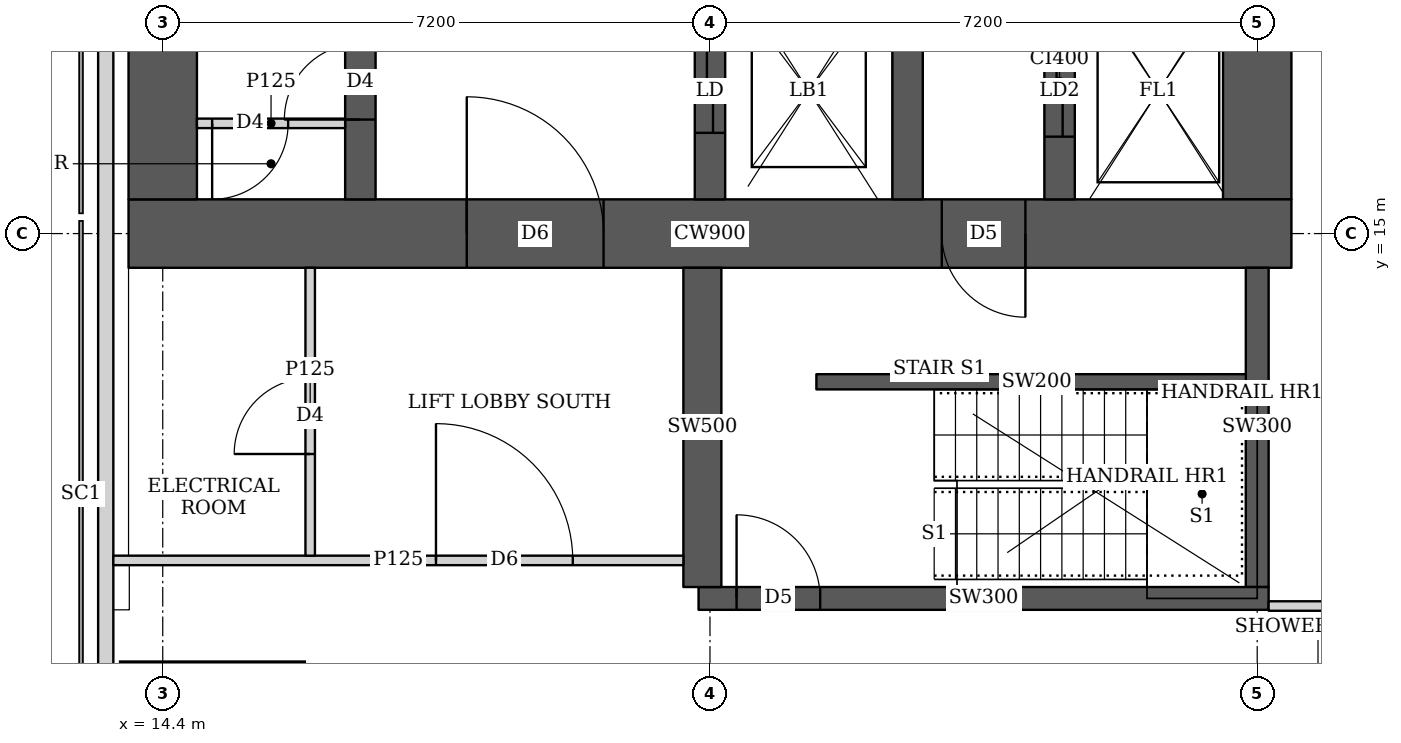
"""IFC4 building model, lengths in metres.
Left out: names, types, materials, properties, quantities, classifications, styles, units other than length and angle.
Written with IfcOpenShell. Run it as: python <this file> out.ifc"""

import sys

from ifc_helpers import new_model, si_unit, direction, frame, frame_2d, origin, origin_2d, place, context, subcontext, project, spatial, rectangle, extrude, element, fill, save


model = new_model("IFC4")
c1 = context("Model", 3, precision=1e-05, world=origin(), true_north=direction((0.0, 1.0)))
c2 = subcontext(c1, "Body", "Model", "MODEL_VIEW")
j1 = project(units=[si_unit("LENGTHUNIT", "METRE"), si_unit("PLANEANGLEUNIT", "RADIAN")], contexts=[c1])
p1 = place(None, origin())
s1 = spatial("IfcSite", under=j1, at=p1, CompositionType="ELEMENT")
p2 = place(p1, origin())
s2 = spatial("IfcBuilding", under=s1, at=p2, CompositionType="ELEMENT")
p3 = place(p2, frame((0.0, 0.0, 234.95)))
s3 = spatial("IfcBuildingStorey", under=s2, at=p3, CompositionType="ELEMENT", Elevation=234.95)
p4 = place(p3, frame((15.054, 8.154, 0.0), z_axis=(0.0, 0.0, 1.0), x_axis=(1.0, 0.0, 0.0)))
e1 = element("IfcColumn", 1, at=p4, inside=s3, PredefinedType="COLUMN", context=c2, shape_type="SweptSolid", body=[
    extrude(rectangle(XDim=2.4, YDim=2.4, at=origin_2d()), origin(), (0.0, 0.0, 1.0), 3.75),
])
p5 = place(p3, frame((13.95, 15.0, 0.0), z_axis=(0.0, 0.0, 1.0), x_axis=(1.0, 0.0, 0.0)))
e2 = element("IfcWall", 2, at=p5, inside=s3, PredefinedType="SHEAR", context=c2, shape_type="SweptSolid", body=[
    extrude(rectangle(XDim=15.3, YDim=0.9, at=frame_2d((7.65, 0.0))), origin(), (0.0, 0.0, 1.0), 3.75),
])
p6 = place(p5, frame((4.45, 0.0, 0.0)))
e3 = element("IfcOpeningElement", 3, at=p6, cuts=e2, PredefinedType="OPENING", context=c2, shape_type="SweptSolid", body=[
    extrude(rectangle(XDim=1.8, YDim=2.1, at=frame_2d((0.9, 1.05))), frame((0.0, 0.46, 0.0), z_axis=(0.0, -1.0, 0.0), x_axis=(1.0, 0.0, 0.0)), (0.0, 0.0, 1.0), 0.92),
])
p7 = place(p5, frame((10.7, 0.0, 0.0)))
e4 = element("IfcOpeningElement", 4, at=p7, cuts=e2, PredefinedType="OPENING", context=c2, shape_type="SweptSolid", body=[
    extrude(rectangle(XDim=1.1, YDim=2.1, at=frame_2d((0.55, 1.05))), frame((0.0, 0.46, 0.0), z_axis=(0.0, -1.0, 0.0), x_axis=(1.0, 0.0, 0.0)), (0.0, 0.0, 1.0), 0.92),
])
for number, where, z_axis, x_axis in (
    (5, (14.4, 15.45, 0.0), (0.0, 0.0, 1.0), (0.0, 1.0, 0.0)),
    (6, (28.8, 15.45, 0.0), (0.0, 0.0, 1.0), (0.0, 1.0, 0.0)),
):
    element("IfcWall", number, at=place(p3, frame(where, z_axis=z_axis, x_axis=x_axis)), inside=s3, PredefinedType="SHEAR", context=c2, shape_type="SweptSolid", body=[
        extrude(rectangle(XDim=14.1, YDim=0.9, at=frame_2d((7.05, 0.0))), origin(), (0.0, 0.0, 1.0), 3.75),
    ])
p8 = place(p3, frame((17.0, 15.45, 0.0), z_axis=(0.0, 0.0, 1.0), x_axis=(0.0, 1.0, 0.0)))
e7 = element("IfcWall", 7, at=p8, inside=s3, PredefinedType="SHEAR", context=c2, shape_type="SweptSolid", body=[
    extrude(rectangle(XDim=14.1, YDim=0.4, at=frame_2d((7.05, 0.0))), origin(), (0.0, 0.0, 1.0), 3.75),
])
p9 = place(p8, frame((1.05, 0.0, 0.0)))
e8 = element("IfcOpeningElement", 8, at=p9, cuts=e7, PredefinedType="OPENING", context=c2, shape_type="SweptSolid", body=[
    extrude(rectangle(XDim=1.0, YDim=2.1, at=frame_2d((0.5, 1.05))), frame((0.0, 0.21, 0.0), z_axis=(0.0, -1.0, 0.0), x_axis=(1.0, 0.0, 0.0)), (0.0, 0.0, 1.0), 0.42),
])
p10 = place(p8, frame((4.675, 0.0, 0.0)))
e9 = element("IfcOpeningElement", 9, at=p10, cuts=e7, PredefinedType="OPENING", context=c2, shape_type="SweptSolid", body=[
    extrude(rectangle(XDim=1.0, YDim=2.1, at=frame_2d((0.5, 1.05))), frame((0.0, 0.21, 0.0), z_axis=(0.0, -1.0, 0.0), x_axis=(1.0, 0.0, 0.0)), (0.0, 0.0, 1.0), 0.42),
])
p11 = place(p8, frame((8.425, 0.0, 0.0)))
e10 = element("IfcOpeningElement", 10, at=p11, cuts=e7, PredefinedType="OPENING", context=c2, shape_type="SweptSolid", body=[
    extrude(rectangle(XDim=1.0, YDim=2.1, at=frame_2d((0.5, 1.05))), frame((0.0, 0.21, 0.0), z_axis=(0.0, -1.0, 0.0), x_axis=(1.0, 0.0, 0.0)), (0.0, 0.0, 1.0), 0.42),
])
p12 = place(p8, frame((12.175, 0.0, 0.0)))
e11 = element("IfcOpeningElement", 11, at=p12, cuts=e7, PredefinedType="OPENING", context=c2, shape_type="SweptSolid", body=[
    extrude(rectangle(XDim=1.0, YDim=2.1, at=frame_2d((0.5, 1.05))), frame((0.0, 0.21, 0.0), z_axis=(0.0, -1.0, 0.0), x_axis=(1.0, 0.0, 0.0)), (0.0, 0.0, 1.0), 0.42),
])
p13 = place(p3, frame((21.6, 15.45, 0.0), z_axis=(0.0, 0.0, 1.0), x_axis=(0.0, 1.0, 0.0)))
e12 = element("IfcWall", 12, at=p13, inside=s3, PredefinedType="SHEAR", context=c2, shape_type="SweptSolid", body=[
    extrude(rectangle(XDim=14.1, YDim=0.4, at=frame_2d((7.05, 0.0))), origin(), (0.0, 0.0, 1.0), 3.75),
])
p14 = place(p13, frame((0.875, 0.0, 0.0)))
e13 = element("IfcOpeningElement", 13, at=p14, cuts=e12, PredefinedType="OPENING", context=c2, shape_type="SweptSolid", body=[
    extrude(rectangle(XDim=1.1, YDim=2.1, at=frame_2d((0.55, 1.05))), frame((0.0, 0.21, 0.0), z_axis=(0.0, -1.0, 0.0), x_axis=(1.0, 0.0, 0.0)), (0.0, 0.0, 1.0), 0.42),
])
p15 = place(p13, frame((4.625, 0.0, 0.0)))
e14 = element("IfcOpeningElement", 14, at=p15, cuts=e12, PredefinedType="OPENING", context=c2, shape_type="SweptSolid", body=[
    extrude(rectangle(XDim=1.1, YDim=2.1, at=frame_2d((0.55, 1.05))), frame((0.0, 0.21, 0.0), z_axis=(0.0, -1.0, 0.0), x_axis=(1.0, 0.0, 0.0)), (0.0, 0.0, 1.0), 0.42),
])
p16 = place(p13, frame((8.375, 0.0, 0.0)))
e15 = element("IfcOpeningElement", 15, at=p16, cuts=e12, PredefinedType="OPENING", context=c2, shape_type="SweptSolid", body=[
    extrude(rectangle(XDim=1.1, YDim=2.1, at=frame_2d((0.55, 1.05))), frame((0.0, 0.21, 0.0), z_axis=(0.0, -1.0, 0.0), x_axis=(1.0, 0.0, 0.0)), (0.0, 0.0, 1.0), 0.42),
])
p17 = place(p13, frame((12.125, 0.0, 0.0)))
e16 = element("IfcOpeningElement", 16, at=p17, cuts=e12, PredefinedType="OPENING", context=c2, shape_type="SweptSolid", body=[
    extrude(rectangle(XDim=1.1, YDim=2.1, at=frame_2d((0.55, 1.05))), frame((0.0, 0.21, 0.0), z_axis=(0.0, -1.0, 0.0), x_axis=(1.0, 0.0, 0.0)), (0.0, 0.0, 1.0), 0.42),
])
p18 = place(p3, frame((24.2, 15.45, 0.0), z_axis=(0.0, 0.0, 1.0), x_axis=(0.0, 1.0, 0.0)))
e17 = element("IfcWall", 17, at=p18, inside=s3, PredefinedType="SHEAR", context=c2, shape_type="SweptSolid", body=[
    extrude(rectangle(XDim=14.1, YDim=0.4, at=frame_2d((7.05, 0.0))), origin(), (0.0, 0.0, 1.0), 3.75),
])
p19 = place(p3, frame((26.2, 15.45, 0.0), z_axis=(0.0, 0.0, 1.0), x_axis=(0.0, 1.0, 0.0)))
e18 = element("IfcWall", 18, at=p19, inside=s3, PredefinedType="SHEAR", context=c2, shape_type="SweptSolid", body=[
    extrude(rectangle(XDim=3.1, YDim=0.4, at=frame_2d((1.55, 0.0))), origin(), (0.0, 0.0, 1.0), 3.75),
])
p20 = place(p19, frame((0.825, 0.0, 0.0)))
e19 = element("IfcOpeningElement", 19, at=p20, cuts=e18, PredefinedType="OPENING", context=c2, shape_type="SweptSolid", body=[
    extrude(rectangle(XDim=1.2, YDim=2.1, at=frame_2d((0.6, 1.05))), frame((0.0, 0.21, 0.0), z_axis=(0.0, -1.0, 0.0), x_axis=(1.0, 0.0, 0.0)), (0.0, 0.0, 1.0), 0.42),
])
p21 = place(p3, frame((21.45, 10.2, 0.0), z_axis=(0.0, 0.0, 1.0), x_axis=(1.0, 0.0, 0.0)))
e20 = element("IfcWall", 20, at=p21, inside=s3, PredefinedType="SHEAR", context=c2, shape_type="SweptSolid", body=[
    extrude(rectangle(XDim=7.5, YDim=0.3, at=frame_2d((3.75, 0.0))), origin(), (0.0, 0.0, 1.0), 3.75),
])
p22 = place(p21, frame((0.5, 0.0, 0.0)))
e21 = element("IfcOpeningElement", 21, at=p22, cuts=e20, PredefinedType="OPENING", context=c2, shape_type="SweptSolid", body=[
    extrude(rectangle(XDim=1.1, YDim=2.1, at=frame_2d((0.55, 1.05))), frame((0.0, 0.16, 0.0), z_axis=(0.0, -1.0, 0.0), x_axis=(1.0, 0.0, 0.0)), (0.0, 0.0, 1.0), 0.32),
])
p23 = place(p3, frame((21.5, 10.35, 0.0), z_axis=(0.0, 0.0, 1.0), x_axis=(0.0, 1.0, 0.0)))
e22 = element("IfcWall", 22, at=p23, inside=s3, PredefinedType="SHEAR", context=c2, shape_type="SweptSolid", body=[
    extrude(rectangle(XDim=4.2, YDim=0.5, at=frame_2d((2.1, 0.0))), origin(), (0.0, 0.0, 1.0), 3.75),
])
p24 = place(p3, frame((28.8, 10.35, 0.0), z_axis=(0.0, 0.0, 1.0), x_axis=(0.0, 1.0, 0.0)))
e23 = element("IfcWall", 23, at=p24, inside=s3, PredefinedType="SHEAR", context=c2, shape_type="SweptSolid", body=[
    extrude(rectangle(XDim=4.2, YDim=0.3, at=frame_2d((2.1, 0.0))), origin(), (0.0, 0.0, 1.0), 3.75),
])
p25 = place(p3, frame((13.65, 44.837, 0.0), z_axis=(0.0, 0.0, 1.0), x_axis=(0.0, -1.0, 0.0)))
e24 = element("IfcWall", 24, at=p25, inside=s3, PredefinedType="SOLIDWALL", context=c2, shape_type="SweptSolid", body=[
    extrude(rectangle(XDim=44.674, YDim=0.2, at=frame_2d((22.337, 0.0))), origin(), (0.0, 0.0, 1.0), 3.5),
])
p26 = place(p25, frame((1.889, 0.0, 0.9)))
e25 = element("IfcOpeningElement", 25, at=p26, cuts=e24, PredefinedType="OPENING", context=c2, shape_type="SweptSolid", body=[
    extrude(rectangle(XDim=2.4, YDim=1.5, at=frame_2d((1.2, 0.75))), frame((0.0, 0.11, 0.0), z_axis=(0.0, -1.0, 0.0), x_axis=(1.0, 0.0, 0.0)), (0.0, 0.0, 1.0), 0.22),
])
p27 = place(p25, frame((40.385, 0.0, 0.9)))
e26 = element("IfcOpeningElement", 26, at=p27, cuts=e24, PredefinedType="OPENING", context=c2, shape_type="SweptSolid", body=[
    extrude(rectangle(XDim=2.4, YDim=1.5, at=frame_2d((1.2, 0.75))), frame((0.0, 0.11, 0.0), z_axis=(0.0, -1.0, 0.0), x_axis=(1.0, 0.0, 0.0)), (0.0, 0.0, 1.0), 0.22),
])
p28 = place(p3, frame((13.75, 10.7, 0.0), z_axis=(0.0, 0.0, 1.0), x_axis=(1.0, 0.0, 0.0)))
e27 = element("IfcWall", 27, at=p28, inside=s3, PredefinedType="PARTITIONING", context=c2, shape_type="SweptSolid", body=[
    extrude(rectangle(XDim=7.5, YDim=0.125, at=frame_2d((3.75, 0.0))), origin(), (0.0, 0.0, 1.0), 3.5),
])
p29 = place(p28, frame((4.245, 0.0, 0.0)))
e28 = element("IfcOpeningElement", 28, at=p29, cuts=e27, PredefinedType="OPENING", context=c2, shape_type="SweptSolid", body=[
    extrude(rectangle(XDim=1.8, YDim=2.1, at=frame_2d((0.9, 1.05))), frame((0.0, 0.073, 0.0), z_axis=(0.0, -1.0, 0.0), x_axis=(1.0, 0.0, 0.0)), (0.0, 0.0, 1.0), 0.145),
])
p30 = place(p3, frame((16.34, 10.762, 0.0), z_axis=(0.0, 0.0, 1.0), x_axis=(0.0, 1.0, 0.0)))
e29 = element("IfcWall", 29, at=p30, inside=s3, PredefinedType="PARTITIONING", context=c2, shape_type="SweptSolid", body=[
    extrude(rectangle(XDim=3.788, YDim=0.125, at=frame_2d((1.894, 0.0))), origin(), (0.0, 0.0, 1.0), 3.5),
])
p31 = place(p30, frame((1.338, 0.0, 0.0)))
e30 = element("IfcOpeningElement", 30, at=p31, cuts=e29, PredefinedType="OPENING", context=c2, shape_type="SweptSolid", body=[
    extrude(rectangle(XDim=1.0, YDim=2.1, at=frame_2d((0.5, 1.05))), frame((0.0, 0.073, 0.0), z_axis=(0.0, -1.0, 0.0), x_axis=(1.0, 0.0, 0.0)), (0.0, 0.0, 1.0), 0.145),
])
p32 = place(p3, frame((28.95, 10.1, 0.0), z_axis=(0.0, 0.0, 1.0), x_axis=(1.0, 0.0, 0.0)))
e31 = element("IfcWall", 31, at=p32, inside=s3, PredefinedType="PARTITIONING", context=c2, shape_type="SweptSolid", body=[
    extrude(rectangle(XDim=9.188, YDim=0.125, at=frame_2d((4.594, 0.0))), origin(), (0.0, 0.0, 1.0), 3.5),
])
p33 = place(p3, frame((14.85, 16.45, 0.0), z_axis=(0.0, 0.0, 1.0), x_axis=(1.0, 0.0, 0.0)))
e32 = element("IfcWall", 32, at=p33, inside=s3, PredefinedType="PARTITIONING", context=c2, shape_type="SweptSolid", body=[
    extrude(rectangle(XDim=1.95, YDim=0.125, at=frame_2d((0.975, 0.0))), origin(), (0.0, 0.0, 1.0), 3.5),
])
p34 = place(p33, frame((0.2, 0.0, 0.0)))
e33 = element("IfcOpeningElement", 33, at=p34, cuts=e32, PredefinedType="OPENING", context=c2, shape_type="SweptSolid", body=[
    extrude(rectangle(XDim=1.0, YDim=2.1, at=frame_2d((0.5, 1.05))), frame((0.0, 0.073, 0.0), z_axis=(0.0, -1.0, 0.0), x_axis=(1.0, 0.0, 0.0)), (0.0, 0.0, 1.0), 0.145),
])
p35 = place(p3, frame((23.0, 13.05, 0.0), z_axis=(0.0, 0.0, 1.0), x_axis=(1.0, 0.0, 0.0)))
e34 = element("IfcWall", 34, at=p35, inside=s3, PredefinedType="SHEAR", context=c2, shape_type="SweptSolid", body=[
    extrude(rectangle(XDim=5.8, YDim=0.2, at=frame_2d((2.9, 0.0))), origin(), (0.0, 0.0, 1.0), 3.75),
])
p36 = place(p31, origin())
e35 = element("IfcDoor", 35, at=p36, inside=s3, OperationType="SINGLE_SWING_LEFT", PredefinedType="DOOR", context=c2, shape_type="SweptSolid", body=[
    extrude(rectangle(XDim=1.0, YDim=2.1, at=frame_2d((0.5, 1.05))), frame((0.0, 0.025, 0.0), z_axis=(0.0, -1.0, 0.0), x_axis=(1.0, 0.0, 0.0)), (0.0, 0.0, 1.0), 0.05),
])
fill(e30, e35)
p37 = place(p29, origin())
e36 = element("IfcDoor", 36, at=p37, inside=s3, OperationType="DOUBLE_DOOR_SINGLE_SWING", PredefinedType="DOOR", context=c2, shape_type="SweptSolid", body=[
    extrude(rectangle(XDim=1.8, YDim=2.1, at=frame_2d((0.9, 1.05))), frame((0.0, 0.025, 0.0), z_axis=(0.0, -1.0, 0.0), x_axis=(1.0, 0.0, 0.0)), (0.0, 0.0, 1.0), 0.05),
])
fill(e28, e36)
p38 = place(p34, origin())
e37 = element("IfcDoor", 37, at=p38, inside=s3, OperationType="SINGLE_SWING_RIGHT", PredefinedType="DOOR", context=c2, shape_type="SweptSolid", body=[
    extrude(rectangle(XDim=1.0, YDim=2.1, at=frame_2d((0.5, 1.05))), frame((0.0, 0.025, 0.0), z_axis=(0.0, -1.0, 0.0), x_axis=(1.0, 0.0, 0.0)), (0.0, 0.0, 1.0), 0.05),
])
fill(e33, e37)
p39 = place(p9, origin())
e38 = element("IfcDoor", 38, at=p39, inside=s3, OperationType="SINGLE_SWING_LEFT", PredefinedType="DOOR", context=c2, shape_type="SweptSolid", body=[
    extrude(rectangle(XDim=1.0, YDim=2.1, at=frame_2d((0.5, 1.05))), frame((0.0, 0.025, 0.0), z_axis=(0.0, -1.0, 0.0), x_axis=(1.0, 0.0, 0.0)), (0.0, 0.0, 1.0), 0.05),
])
fill(e8, e38)
p40 = place(p6, origin())
e39 = element("IfcDoor", 39, at=p40, inside=s3, OperationType="DOUBLE_DOOR_SINGLE_SWING", PredefinedType="DOOR", context=c2, shape_type="SweptSolid", body=[
    extrude(rectangle(XDim=1.8, YDim=2.1, at=frame_2d((0.9, 1.05))), frame((0.0, 0.025, 0.0), z_axis=(0.0, -1.0, 0.0), x_axis=(1.0, 0.0, 0.0)), (0.0, 0.0, 1.0), 0.05),
])
fill(e3, e39)
p41 = place(p7, origin())
e40 = element("IfcDoor", 40, at=p41, inside=s3, OperationType="SINGLE_SWING_LEFT", PredefinedType="DOOR", context=c2, shape_type="SweptSolid", body=[
    extrude(rectangle(XDim=1.1, YDim=2.1, at=frame_2d((0.55, 1.05))), frame((0.0, 0.025, 0.0), z_axis=(0.0, -1.0, 0.0), x_axis=(1.0, 0.0, 0.0)), (0.0, 0.0, 1.0), 0.05),
])
fill(e4, e40)
p42 = place(p20, origin())
e41 = element("IfcDoor", 41, at=p42, inside=s3, OperationType="DOUBLE_DOOR_SLIDING", PredefinedType="DOOR", context=c2, shape_type="SweptSolid", body=[
    extrude(rectangle(XDim=1.2, YDim=2.1, at=frame_2d((0.6, 1.05))), frame((0.0, 0.025, 0.0), z_axis=(0.0, -1.0, 0.0), x_axis=(1.0, 0.0, 0.0)), (0.0, 0.0, 1.0), 0.05),
])
fill(e19, e41)
p43 = place(p14, origin())
e42 = element("IfcDoor", 42, at=p43, inside=s3, OperationType="DOUBLE_DOOR_SLIDING", PredefinedType="DOOR", context=c2, shape_type="SweptSolid", body=[
    extrude(rectangle(XDim=1.1, YDim=2.1, at=frame_2d((0.55, 1.05))), frame((0.0, 0.025, 0.0), z_axis=(0.0, -1.0, 0.0), x_axis=(1.0, 0.0, 0.0)), (0.0, 0.0, 1.0), 0.05),
])
fill(e13, e42)
p44 = place(p22, origin())
e43 = element("IfcDoor", 43, at=p44, inside=s3, OperationType="SINGLE_SWING_LEFT", PredefinedType="DOOR", context=c2, shape_type="SweptSolid", body=[
    extrude(rectangle(XDim=1.1, YDim=2.1, at=frame_2d((0.55, 1.05))), frame((0.0, 0.025, 0.0), z_axis=(0.0, -1.0, 0.0), x_axis=(1.0, 0.0, 0.0)), (0.0, 0.0, 1.0), 0.05),
])
fill(e21, e43)
save(model, sys.argv[1])
